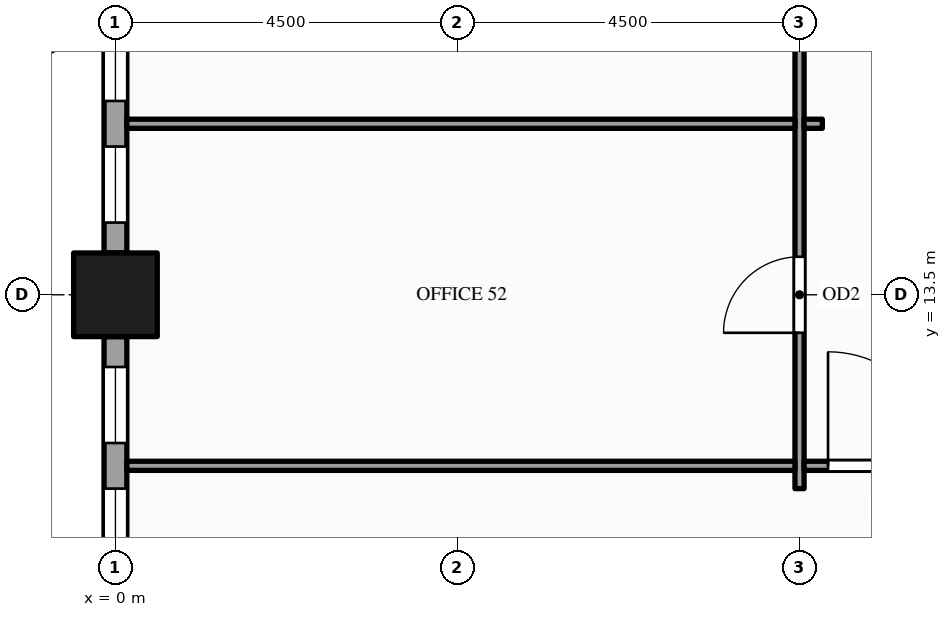
"""IFC4 building model, lengths in metres.
Left out: names, types, materials, properties, quantities, classifications, styles, units other than length and angle.
Written with IfcOpenShell. Run it as: python <this file> out.ifc"""

import sys

from ifc_helpers import new_model, si_unit, direction, frame, frame_2d, origin, origin_2d, place, context, subcontext, project, spatial, rectangle, hollow_rectangle, extrude, element, fill, save


model = new_model("IFC4")
c1 = context("Model", 3, precision=1e-05, world=origin(), true_north=direction((0.0, 1.0)))
c2 = subcontext(c1, "Body", "Model", "MODEL_VIEW")
j1 = project(units=[si_unit("LENGTHUNIT", "METRE"), si_unit("PLANEANGLEUNIT", "RADIAN")], contexts=[c1])
p1 = place(None, origin())
s1 = spatial("IfcSite", under=j1, at=p1, CompositionType="ELEMENT")
p2 = place(p1, origin())
s2 = spatial("IfcBuilding", under=s1, at=p2, CompositionType="ELEMENT")
p3 = place(p2, frame((0.0, 0.0, 29.0)))
s3 = spatial("IfcBuildingStorey", under=s2, at=p3, CompositionType="ELEMENT", Elevation=29.0)
p4 = place(p3, frame((0.0, 13.5, -0.15), z_axis=(0.0, 0.0, 1.0), x_axis=(1.0, 0.0, 0.0)))
e1 = element("IfcColumn", 1, at=p4, inside=s3, PredefinedType="COLUMN", context=c2, shape_type="SweptSolid", body=[
    extrude(hollow_rectangle(XDim=1.1, YDim=1.1, WallThickness=0.06, at=origin_2d()), origin(), (0.0, 0.0, 1.0), 4.0),
])
p5 = place(p3, frame((0.0, 17.45, 0.0), z_axis=(0.0, 0.0, 1.0), x_axis=(0.0, -1.0, 0.0)))
e2 = element("IfcWall", 2, at=p5, inside=s3, PredefinedType="STANDARD", context=c2, shape_type="SweptSolid", body=[
    extrude(rectangle(XDim=3.4, YDim=0.3, at=frame_2d((1.7, 0.0))), origin(), (0.0, 0.0, 1.0), 3.144),
])
p6 = place(p5, frame((0.4, 0.0, 0.9)))
e3 = element("IfcOpeningElement", 3, at=p6, cuts=e2, PredefinedType="OPENING", context=c2, shape_type="SweptSolid", body=[
    extrude(rectangle(XDim=1.0, YDim=2.0, at=frame_2d((0.5, 1.0))), frame((0.0, 0.16, 0.0), z_axis=(0.0, -1.0, 0.0), x_axis=(1.0, 0.0, 0.0)), (0.0, 0.0, 1.0), 0.32),
])
p7 = place(p5, frame((2.0, 0.0, 0.9)))
e4 = element("IfcOpeningElement", 4, at=p7, cuts=e2, PredefinedType="OPENING", context=c2, shape_type="SweptSolid", body=[
    extrude(rectangle(XDim=1.0, YDim=2.0, at=frame_2d((0.5, 1.0))), frame((0.0, 0.16, 0.0), z_axis=(0.0, -1.0, 0.0), x_axis=(1.0, 0.0, 0.0)), (0.0, 0.0, 1.0), 0.32),
])
p8 = place(p3, frame((0.0, 12.95, 0.0), z_axis=(0.0, 0.0, 1.0), x_axis=(0.0, -1.0, 0.0)))
e5 = element("IfcWall", 5, at=p8, inside=s3, PredefinedType="STANDARD", context=c2, shape_type="SweptSolid", body=[
    extrude(rectangle(XDim=3.4, YDim=0.3, at=frame_2d((1.7, 0.0))), origin(), (0.0, 0.0, 1.0), 3.144),
])
p9 = place(p8, frame((0.4, 0.0, 0.9)))
e6 = element("IfcOpeningElement", 6, at=p9, cuts=e5, PredefinedType="OPENING", context=c2, shape_type="SweptSolid", body=[
    extrude(rectangle(XDim=1.0, YDim=2.0, at=frame_2d((0.5, 1.0))), frame((0.0, 0.16, 0.0), z_axis=(0.0, -1.0, 0.0), x_axis=(1.0, 0.0, 0.0)), (0.0, 0.0, 1.0), 0.32),
])
p10 = place(p8, frame((2.0, 0.0, 0.9)))
e7 = element("IfcOpeningElement", 7, at=p10, cuts=e5, PredefinedType="OPENING", context=c2, shape_type="SweptSolid", body=[
    extrude(rectangle(XDim=1.0, YDim=2.0, at=frame_2d((0.5, 1.0))), frame((0.0, 0.16, 0.0), z_axis=(0.0, -1.0, 0.0), x_axis=(1.0, 0.0, 0.0)), (0.0, 0.0, 1.0), 0.32),
])
p11 = place(p3, frame((9.0, 10.95, 0.0), z_axis=(0.0, 0.0, 1.0), x_axis=(0.0, 1.0, 0.0)))
e8 = element("IfcWall", 8, at=p11, inside=s3, PredefinedType="PARTITIONING", context=c2, shape_type="SweptSolid", body=[
    extrude(rectangle(XDim=20.85, YDim=0.12, at=frame_2d((10.425, 0.0))), origin(), (0.0, 0.0, 1.0), 2.6),
])
p12 = place(p11, frame((2.05, 0.0, 0.0)))
e9 = element("IfcOpeningElement", 9, at=p12, cuts=e8, PredefinedType="OPENING", context=c2, shape_type="SweptSolid", body=[
    extrude(rectangle(XDim=1.0, YDim=2.1, at=frame_2d((0.5, 1.05))), frame((0.0, 0.07, 0.0), z_axis=(0.0, -1.0, 0.0), x_axis=(1.0, 0.0, 0.0)), (0.0, 0.0, 1.0), 0.14),
])
p13 = place(p11, frame((6.6, 0.0, 0.0)))
e10 = element("IfcOpeningElement", 10, at=p13, cuts=e8, PredefinedType="OPENING", context=c2, shape_type="SweptSolid", body=[
    extrude(rectangle(XDim=0.9, YDim=2.1, at=frame_2d((0.45, 1.05))), frame((0.0, 0.07, 0.0), z_axis=(0.0, -1.0, 0.0), x_axis=(1.0, 0.0, 0.0)), (0.0, 0.0, 1.0), 0.14),
])
p14 = place(p11, frame((11.805, 0.0, 0.0)))
e11 = element("IfcOpeningElement", 11, at=p14, cuts=e8, PredefinedType="OPENING", context=c2, shape_type="SweptSolid", body=[
    extrude(rectangle(XDim=1.8, YDim=2.1, at=frame_2d((0.9, 1.05))), frame((0.0, 0.07, 0.0), z_axis=(0.0, -1.0, 0.0), x_axis=(1.0, 0.0, 0.0)), (0.0, 0.0, 1.0), 0.14),
])
p15 = place(p3, frame((0.15, 11.25, 0.0), z_axis=(0.0, 0.0, 1.0), x_axis=(1.0, 0.0, 0.0)))
e12 = element("IfcWall", 12, at=p15, inside=s3, PredefinedType="PARTITIONING", context=c2, shape_type="SweptSolid", body=[
    extrude(rectangle(XDim=8.79, YDim=0.12, at=frame_2d((4.395, 0.0))), origin(), (0.0, 0.0, 1.0), 2.938),
])
p16 = place(p3, frame((9.06, 11.25, 0.0), z_axis=(0.0, 0.0, 1.0), x_axis=(1.0, 0.0, 0.0)))
e13 = element("IfcWall", 13, at=p16, inside=s3, PredefinedType="PARTITIONING", context=c2, shape_type="SweptSolid", body=[
    extrude(rectangle(XDim=2.13, YDim=0.12, at=frame_2d((1.065, 0.0))), origin(), (0.0, 0.0, 1.0), 2.938),
])
p17 = place(p16, frame((0.315, 0.0, 0.0)))
e14 = element("IfcOpeningElement", 14, at=p17, cuts=e13, PredefinedType="OPENING", context=c2, shape_type="SweptSolid", body=[
    extrude(rectangle(XDim=1.5, YDim=2.1, at=frame_2d((0.75, 1.05))), frame((0.0, 0.07, 0.0), z_axis=(0.0, -1.0, 0.0), x_axis=(1.0, 0.0, 0.0)), (0.0, 0.0, 1.0), 0.14),
])
p18 = place(p3, frame((0.15, 15.75, 0.0), z_axis=(0.0, 0.0, 1.0), x_axis=(1.0, 0.0, 0.0)))
e15 = element("IfcWall", 15, at=p18, inside=s3, PredefinedType="PARTITIONING", context=c2, shape_type="SweptSolid", body=[
    extrude(rectangle(XDim=8.79, YDim=0.12, at=frame_2d((4.395, 0.0))), origin(), (0.0, 0.0, 1.0), 2.938),
])
p19 = place(p3, frame((9.06, 15.75, 0.0), z_axis=(0.0, 0.0, 1.0), x_axis=(1.0, 0.0, 0.0)))
e16 = element("IfcWall", 16, at=p19, inside=s3, PredefinedType="PARTITIONING", context=c2, shape_type="SweptSolid", body=[
    extrude(rectangle(XDim=0.24, YDim=0.12, at=frame_2d((0.12, 0.0))), origin(), (0.0, 0.0, 1.0), 2.938),
])
p20 = place(p6, origin())
e17 = element("IfcWindow", 17, at=p20, inside=s3, PartitioningType="SINGLE_PANEL", PredefinedType="WINDOW", context=c2, shape_type="SweptSolid", body=[
    extrude(rectangle(XDim=1.0, YDim=2.0, at=frame_2d((0.5, 1.0))), frame((0.0, 0.03, 0.0), z_axis=(0.0, -1.0, 0.0), x_axis=(1.0, 0.0, 0.0)), (0.0, 0.0, 1.0), 0.06),
])
fill(e3, e17)
p21 = place(p7, origin())
e18 = element("IfcWindow", 18, at=p21, inside=s3, PartitioningType="SINGLE_PANEL", PredefinedType="WINDOW", context=c2, shape_type="SweptSolid", body=[
    extrude(rectangle(XDim=1.0, YDim=2.0, at=frame_2d((0.5, 1.0))), frame((0.0, 0.03, 0.0), z_axis=(0.0, -1.0, 0.0), x_axis=(1.0, 0.0, 0.0)), (0.0, 0.0, 1.0), 0.06),
])
fill(e4, e18)
p22 = place(p9, origin())
e19 = element("IfcWindow", 19, at=p22, inside=s3, PartitioningType="SINGLE_PANEL", PredefinedType="WINDOW", context=c2, shape_type="SweptSolid", body=[
    extrude(rectangle(XDim=1.0, YDim=2.0, at=frame_2d((0.5, 1.0))), frame((0.0, 0.03, 0.0), z_axis=(0.0, -1.0, 0.0), x_axis=(1.0, 0.0, 0.0)), (0.0, 0.0, 1.0), 0.06),
])
fill(e6, e19)
p23 = place(p10, origin())
e20 = element("IfcWindow", 20, at=p23, inside=s3, PartitioningType="SINGLE_PANEL", PredefinedType="WINDOW", context=c2, shape_type="SweptSolid", body=[
    extrude(rectangle(XDim=1.0, YDim=2.0, at=frame_2d((0.5, 1.0))), frame((0.0, 0.03, 0.0), z_axis=(0.0, -1.0, 0.0), x_axis=(1.0, 0.0, 0.0)), (0.0, 0.0, 1.0), 0.06),
])
fill(e7, e20)
p24 = place(p17, origin())
e21 = element("IfcDoor", 21, at=p24, inside=s3, OperationType="SINGLE_SWING_LEFT", PredefinedType="DOOR", context=c2, shape_type="SweptSolid", body=[
    extrude(rectangle(XDim=1.5, YDim=2.1, at=frame_2d((0.75, 1.05))), frame((0.0, 0.025, 0.0), z_axis=(0.0, -1.0, 0.0), x_axis=(1.0, 0.0, 0.0)), (0.0, 0.0, 1.0), 0.05),
])
fill(e14, e21)
p25 = place(p12, origin())
e22 = element("IfcDoor", 22, at=p25, inside=s3, OperationType="SINGLE_SWING_LEFT", PredefinedType="DOOR", context=c2, shape_type="SweptSolid", body=[
    extrude(rectangle(XDim=1.0, YDim=2.1, at=frame_2d((0.5, 1.05))), frame((0.0, 0.025, 0.0), z_axis=(0.0, -1.0, 0.0), x_axis=(1.0, 0.0, 0.0)), (0.0, 0.0, 1.0), 0.05),
])
fill(e9, e22)
save(model, sys.argv[1])
